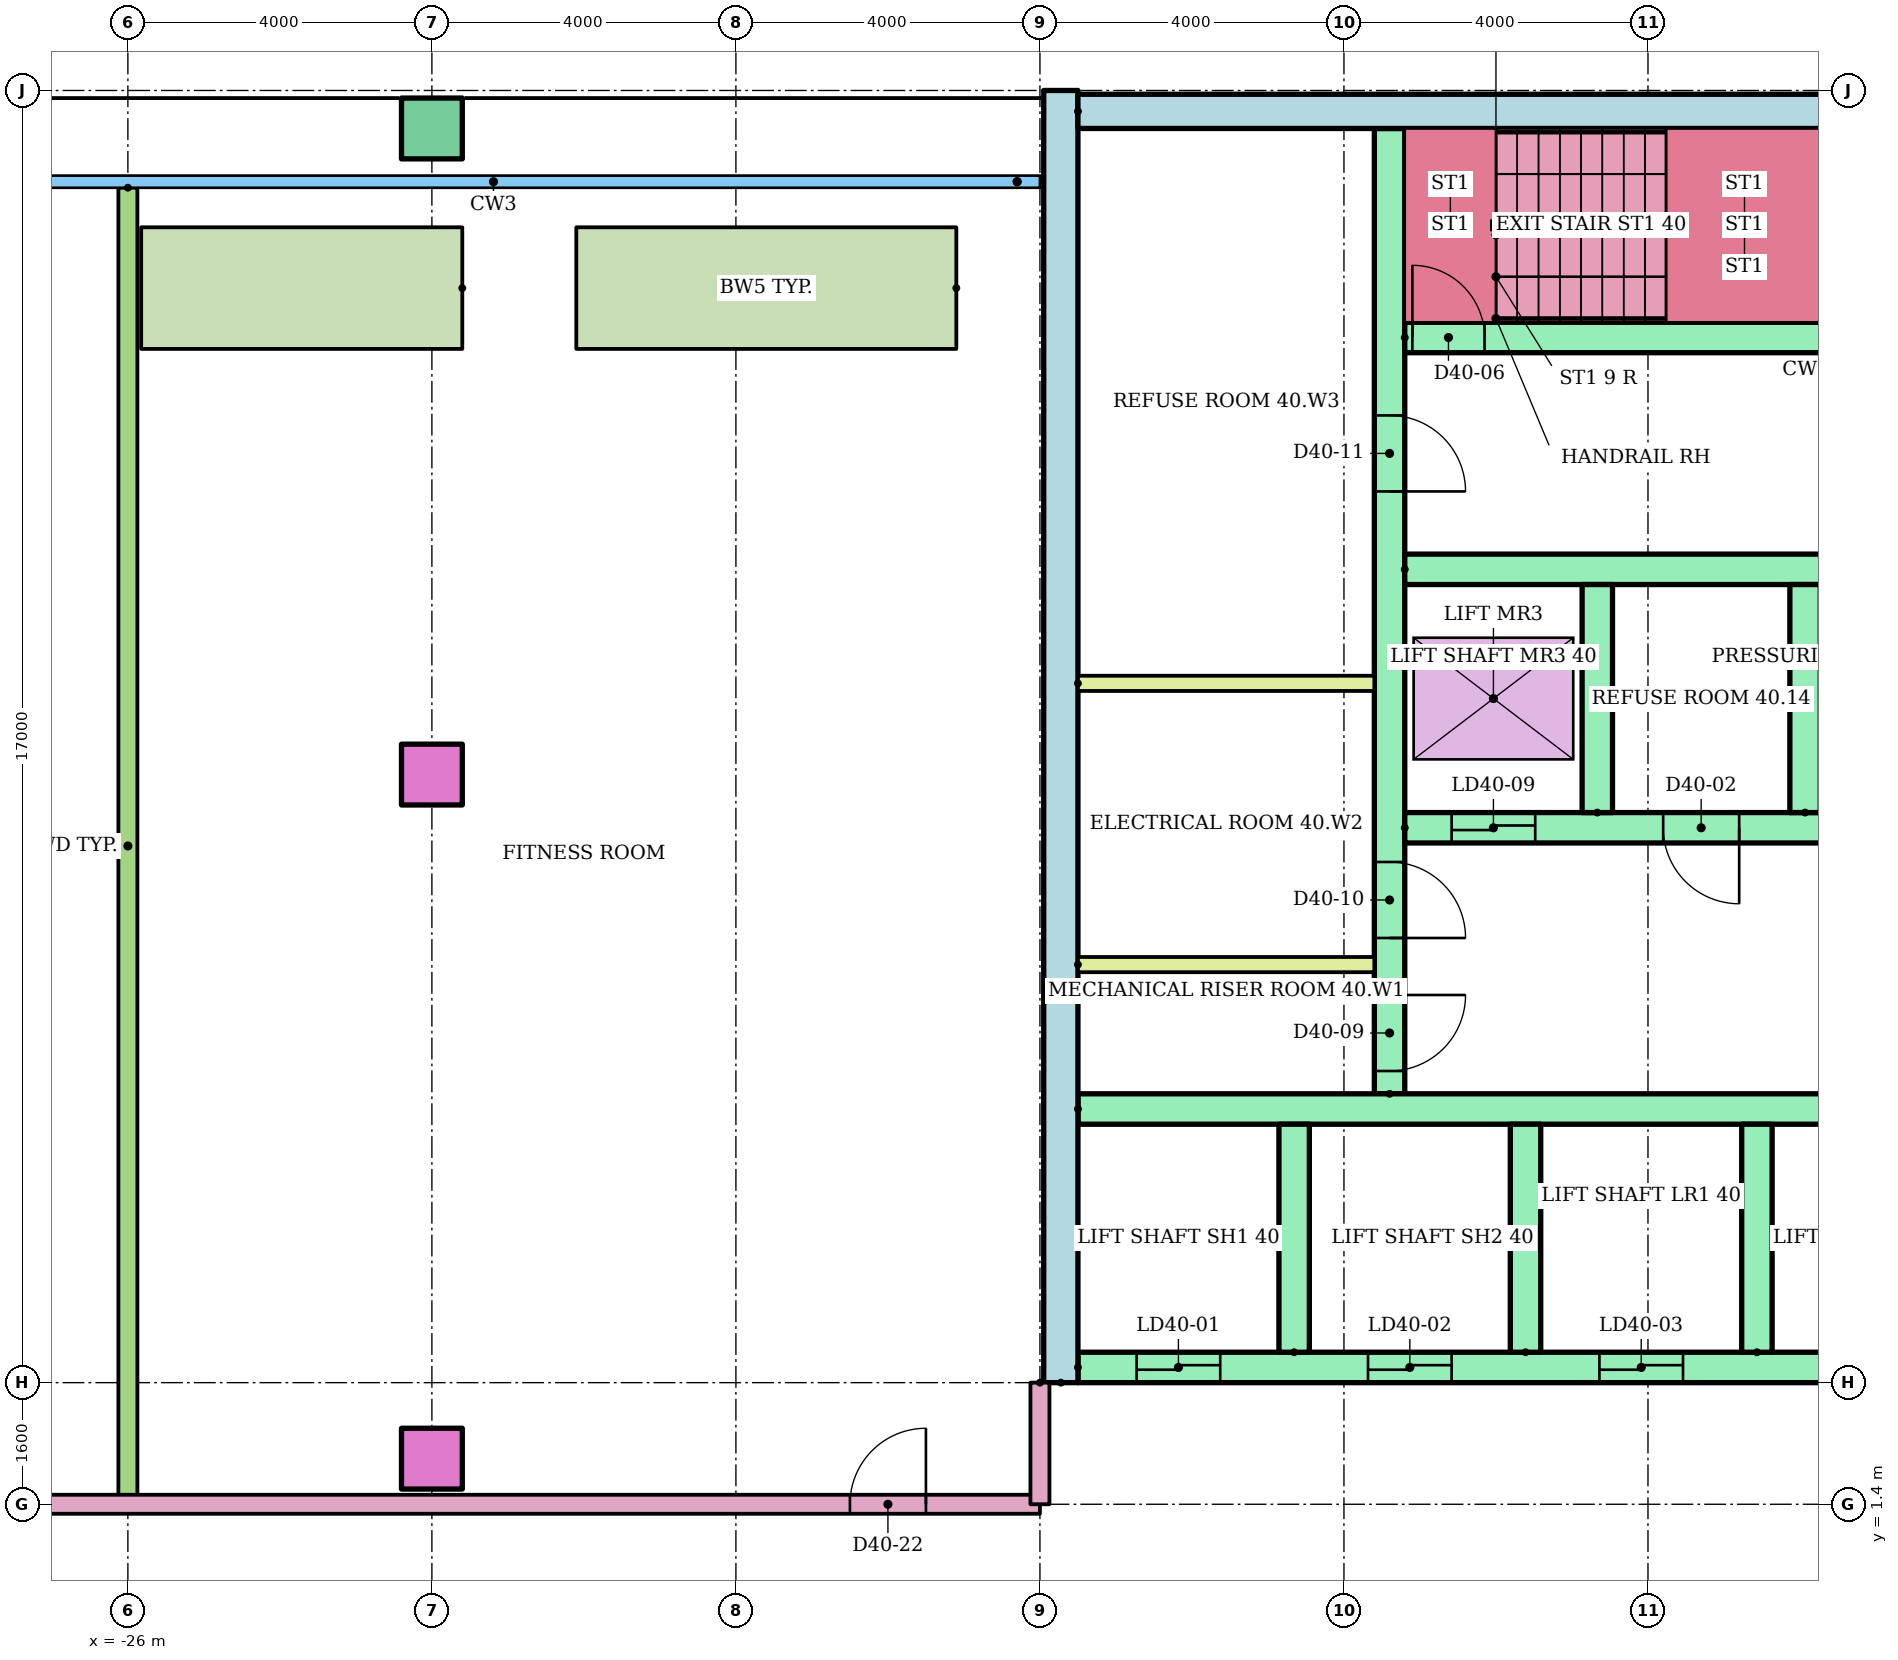
"""IFC4 building model, lengths in metres.
Left out: names, types, materials, properties, quantities, classifications, styles, units other than length and angle.
Written with IfcOpenShell. Run it as: python <this file> out.ifc"""

import sys

from ifc_helpers import new_model, si_unit, direction, frame, frame_2d, origin, origin_2d, place, context, subcontext, project, spatial, rectangle, hollow_rectangle, extrude, element, fill, save


model = new_model("IFC4")
c1 = context("Model", 3, precision=1e-05, world=origin(), true_north=direction((0.0, 1.0)))
c2 = subcontext(c1, "Body", "Model", "MODEL_VIEW")
j1 = project(units=[si_unit("LENGTHUNIT", "METRE"), si_unit("PLANEANGLEUNIT", "RADIAN")], contexts=[c1])
p1 = place(None, origin())
s1 = spatial("IfcSite", under=j1, at=p1, CompositionType="ELEMENT")
p2 = place(p1, origin())
s2 = spatial("IfcBuilding", under=s1, at=p2, CompositionType="ELEMENT")
p3 = place(p2, frame((0.0, 0.0, 151.8)))
s3 = spatial("IfcBuildingStorey", under=s2, at=p3, CompositionType="ELEMENT", Elevation=151.8)
for number, where in (
    (1, (-22.0, 2.0, 0.0)),
    (2, (-22.0, 11.0, 0.0)),
):
    element("IfcColumn", number, at=place(p3, frame(where)), inside=s3, PredefinedType="COLUMN", context=c2, shape_type="SweptSolid", body=[
        extrude(rectangle(XDim=0.8, YDim=0.8, at=origin_2d()), origin(), (0.0, 0.0, 1.0), 9.6),
    ])
p4 = place(p3, frame((-22.0, 19.5, 0.0)))
e3 = element("IfcColumn", 3, at=p4, inside=s3, PredefinedType="COLUMN", context=c2, shape_type="SweptSolid", body=[
    extrude(hollow_rectangle(XDim=0.8, YDim=0.8, WallThickness=0.04, at=origin_2d()), origin(), (0.0, 0.0, 1.0), 8.8),
])
p5 = place(p3, frame((-15.1, 17.4, 0.0), z_axis=(0.0, 0.0, 1.0), x_axis=(-1.0, 0.0, 0.0)))
e4 = element("IfcWall", 4, at=p5, inside=s3, PredefinedType="STANDARD", context=c2, shape_type="SweptSolid", body=[
    extrude(rectangle(XDim=5.0, YDim=1.6, at=frame_2d((2.5, 0.0))), origin(), (0.0, 0.0, 1.0), 0.8),
])
p6 = place(p3, frame((-13.725, 3.0, 0.0), z_axis=(0.0, 0.0, 1.0), x_axis=(0.0, 1.0, 0.0)))
e5 = element("IfcWall", 5, at=p6, inside=s3, PredefinedType="SHEAR", context=c2, shape_type="SweptSolid", body=[
    extrude(rectangle(XDim=17.0, YDim=0.45, at=frame_2d((8.5, 0.0))), origin(), (0.0, 0.0, 1.0), 8.8),
])
p7 = place(p3, frame((-13.5, 19.725, 0.0)))
e6 = element("IfcWall", 6, at=p7, inside=s3, PredefinedType="SHEAR", context=c2, shape_type="SweptSolid", body=[
    extrude(rectangle(XDim=27.0, YDim=0.45, at=frame_2d((13.5, 0.0))), origin(), (0.0, 0.0, 1.0), 8.8),
])
p8 = place(p3, frame((-9.4, 6.8, 0.0), z_axis=(0.0, 0.0, 1.0), x_axis=(0.0, 1.0, 0.0)))
e7 = element("IfcWall", 7, at=p8, inside=s3, PredefinedType="SHEAR", context=c2, shape_type="SweptSolid", body=[
    extrude(rectangle(XDim=12.7, YDim=0.4, at=frame_2d((6.35, 0.0))), origin(), (0.0, 0.0, 1.0), 8.8),
])
p9 = place(p8, frame((0.3, 0.0, 0.0)))
e8 = element("IfcOpeningElement", 8, at=p9, cuts=e7, PredefinedType="OPENING", context=c2, shape_type="SweptSolid", body=[
    extrude(rectangle(XDim=1.0, YDim=2.1, at=frame_2d((0.5, 1.05))), frame((0.0, 0.21, 0.0), z_axis=(0.0, -1.0, 0.0), x_axis=(1.0, 0.0, 0.0)), (0.0, 0.0, 1.0), 0.42),
])
p10 = place(p8, frame((2.05, 0.0, 0.0)))
e9 = element("IfcOpeningElement", 9, at=p10, cuts=e7, PredefinedType="OPENING", context=c2, shape_type="SweptSolid", body=[
    extrude(rectangle(XDim=1.0, YDim=2.1, at=frame_2d((0.5, 1.05))), frame((0.0, 0.21, 0.0), z_axis=(0.0, -1.0, 0.0), x_axis=(1.0, 0.0, 0.0)), (0.0, 0.0, 1.0), 0.42),
])
p11 = place(p8, frame((7.925, 0.0, 0.0)))
e10 = element("IfcOpeningElement", 10, at=p11, cuts=e7, PredefinedType="OPENING", context=c2, shape_type="SweptSolid", body=[
    extrude(rectangle(XDim=1.0, YDim=2.1, at=frame_2d((0.5, 1.05))), frame((0.0, 0.21, 0.0), z_axis=(0.0, -1.0, 0.0), x_axis=(1.0, 0.0, 0.0)), (0.0, 0.0, 1.0), 0.42),
])
p12 = place(p3, frame((-13.5, 3.2, 0.0)))
e11 = element("IfcWall", 11, at=p12, inside=s3, PredefinedType="SHEAR", context=c2, shape_type="SweptSolid", body=[
    extrude(rectangle(XDim=27.0, YDim=0.4, at=frame_2d((13.5, 0.0))), origin(), (0.0, 0.0, 1.0), 8.8),
])
p13 = place(p12, frame((0.772, 0.0, 0.0)))
e12 = element("IfcOpeningElement", 12, at=p13, cuts=e11, PredefinedType="OPENING", context=c2, shape_type="SweptSolid", body=[
    extrude(rectangle(XDim=1.1, YDim=2.1, at=frame_2d((0.55, 1.05))), frame((0.0, 0.21, 0.0), z_axis=(0.0, -1.0, 0.0), x_axis=(1.0, 0.0, 0.0)), (0.0, 0.0, 1.0), 0.42),
])
p14 = place(p12, frame((3.817, 0.0, 0.0)))
e13 = element("IfcOpeningElement", 13, at=p14, cuts=e11, PredefinedType="OPENING", context=c2, shape_type="SweptSolid", body=[
    extrude(rectangle(XDim=1.1, YDim=2.1, at=frame_2d((0.55, 1.05))), frame((0.0, 0.21, 0.0), z_axis=(0.0, -1.0, 0.0), x_axis=(1.0, 0.0, 0.0)), (0.0, 0.0, 1.0), 0.42),
])
p15 = place(p12, frame((6.861, 0.0, 0.0)))
e14 = element("IfcOpeningElement", 14, at=p15, cuts=e11, PredefinedType="OPENING", context=c2, shape_type="SweptSolid", body=[
    extrude(rectangle(XDim=1.1, YDim=2.1, at=frame_2d((0.55, 1.05))), frame((0.0, 0.21, 0.0), z_axis=(0.0, -1.0, 0.0), x_axis=(1.0, 0.0, 0.0)), (0.0, 0.0, 1.0), 0.42),
])
p16 = place(p12, frame((9.906, 0.0, 0.0)))
e15 = element("IfcOpeningElement", 15, at=p16, cuts=e11, PredefinedType="OPENING", context=c2, shape_type="SweptSolid", body=[
    extrude(rectangle(XDim=1.1, YDim=2.1, at=frame_2d((0.55, 1.05))), frame((0.0, 0.21, 0.0), z_axis=(0.0, -1.0, 0.0), x_axis=(1.0, 0.0, 0.0)), (0.0, 0.0, 1.0), 0.42),
])
p17 = place(p12, frame((15.994, 0.0, 0.0)))
e16 = element("IfcOpeningElement", 16, at=p17, cuts=e11, PredefinedType="OPENING", context=c2, shape_type="SweptSolid", body=[
    extrude(rectangle(XDim=1.1, YDim=2.1, at=frame_2d((0.55, 1.05))), frame((0.0, 0.21, 0.0), z_axis=(0.0, -1.0, 0.0), x_axis=(1.0, 0.0, 0.0)), (0.0, 0.0, 1.0), 0.42),
])
p18 = place(p12, frame((19.039, 0.0, 0.0)))
e17 = element("IfcOpeningElement", 17, at=p18, cuts=e11, PredefinedType="OPENING", context=c2, shape_type="SweptSolid", body=[
    extrude(rectangle(XDim=1.1, YDim=2.1, at=frame_2d((0.55, 1.05))), frame((0.0, 0.21, 0.0), z_axis=(0.0, -1.0, 0.0), x_axis=(1.0, 0.0, 0.0)), (0.0, 0.0, 1.0), 0.42),
])
p19 = place(p12, frame((22.083, 0.0, 0.0)))
e18 = element("IfcOpeningElement", 18, at=p19, cuts=e11, PredefinedType="OPENING", context=c2, shape_type="SweptSolid", body=[
    extrude(rectangle(XDim=1.1, YDim=2.1, at=frame_2d((0.55, 1.05))), frame((0.0, 0.21, 0.0), z_axis=(0.0, -1.0, 0.0), x_axis=(1.0, 0.0, 0.0)), (0.0, 0.0, 1.0), 0.42),
])
p20 = place(p12, frame((25.128, 0.0, 0.0)))
e19 = element("IfcOpeningElement", 19, at=p20, cuts=e11, PredefinedType="OPENING", context=c2, shape_type="SweptSolid", body=[
    extrude(rectangle(XDim=1.1, YDim=2.1, at=frame_2d((0.55, 1.05))), frame((0.0, 0.21, 0.0), z_axis=(0.0, -1.0, 0.0), x_axis=(1.0, 0.0, 0.0)), (0.0, 0.0, 1.0), 0.42),
])
p21 = place(p12, frame((12.6, 0.0, 0.0)))
e20 = element("IfcOpeningElement", 20, at=p21, cuts=e11, PredefinedType="OPENING", context=c2, shape_type="SweptSolid", body=[
    extrude(rectangle(XDim=1.8, YDim=2.1, at=frame_2d((0.9, 1.05))), frame((0.0, 0.21, 0.0), z_axis=(0.0, -1.0, 0.0), x_axis=(1.0, 0.0, 0.0)), (0.0, 0.0, 1.0), 0.42),
])
p22 = place(p3, frame((-13.5, 6.6, 0.0)))
e21 = element("IfcWall", 21, at=p22, inside=s3, PredefinedType="SHEAR", context=c2, shape_type="SweptSolid", body=[
    extrude(rectangle(XDim=11.978, YDim=0.4, at=frame_2d((5.989, 0.0))), origin(), (0.0, 0.0, 1.0), 8.8),
])
for number, where, z_axis, x_axis in (
    (22, (-10.656, 3.4, 0.0), (0.0, 0.0, 1.0), (0.0, 1.0, 0.0)),
    (23, (-7.611, 3.4, 0.0), (0.0, 0.0, 1.0), (0.0, 1.0, 0.0)),
    (24, (-4.567, 3.4, 0.0), (0.0, 0.0, 1.0), (0.0, 1.0, 0.0)),
):
    element("IfcWall", number, at=place(p3, frame(where, z_axis=z_axis, x_axis=x_axis)), inside=s3, PredefinedType="SHEAR", context=c2, shape_type="SweptSolid", body=[
        extrude(rectangle(XDim=3.0, YDim=0.4, at=frame_2d((1.5, 0.0))), origin(), (0.0, 0.0, 1.0), 8.8),
    ])
p23 = place(p3, frame((-9.2, 10.3, 0.0)))
e25 = element("IfcWall", 25, at=p23, inside=s3, PredefinedType="SHEAR", context=c2, shape_type="SweptSolid", body=[
    extrude(rectangle(XDim=8.0, YDim=0.4, at=frame_2d((4.0, 0.0))), origin(), (0.0, 0.0, 1.0), 8.8),
])
p24 = place(p23, frame((0.617, 0.0, 0.0)))
e26 = element("IfcOpeningElement", 26, at=p24, cuts=e25, PredefinedType="OPENING", context=c2, shape_type="SweptSolid", body=[
    extrude(rectangle(XDim=1.1, YDim=2.1, at=frame_2d((0.55, 1.05))), frame((0.0, 0.21, 0.0), z_axis=(0.0, -1.0, 0.0), x_axis=(1.0, 0.0, 0.0)), (0.0, 0.0, 1.0), 0.42),
])
p25 = place(p23, frame((3.4, 0.0, 0.0)))
e27 = element("IfcOpeningElement", 27, at=p25, cuts=e25, PredefinedType="OPENING", context=c2, shape_type="SweptSolid", body=[
    extrude(rectangle(XDim=1.0, YDim=2.1, at=frame_2d((0.5, 1.05))), frame((0.0, 0.21, 0.0), z_axis=(0.0, -1.0, 0.0), x_axis=(1.0, 0.0, 0.0)), (0.0, 0.0, 1.0), 0.42),
])
p26 = place(p23, frame((6.133, 0.0, 0.0)))
e28 = element("IfcOpeningElement", 28, at=p26, cuts=e25, PredefinedType="OPENING", context=c2, shape_type="SweptSolid", body=[
    extrude(rectangle(XDim=1.0, YDim=2.1, at=frame_2d((0.5, 1.05))), frame((0.0, 0.21, 0.0), z_axis=(0.0, -1.0, 0.0), x_axis=(1.0, 0.0, 0.0)), (0.0, 0.0, 1.0), 0.42),
])
p27 = place(p3, frame((-9.2, 13.7, 0.0)))
e29 = element("IfcWall", 29, at=p27, inside=s3, PredefinedType="SHEAR", context=c2, shape_type="SweptSolid", body=[
    extrude(rectangle(XDim=8.0, YDim=0.4, at=frame_2d((4.0, 0.0))), origin(), (0.0, 0.0, 1.0), 8.8),
])
for number, where, z_axis, x_axis in (
    (30, (-6.667, 10.5, 0.0), (0.0, 0.0, 1.0), (0.0, 1.0, 0.0)),
    (31, (-3.933, 10.5, 0.0), (0.0, 0.0, 1.0), (0.0, 1.0, 0.0)),
):
    element("IfcWall", number, at=place(p3, frame(where, z_axis=z_axis, x_axis=x_axis)), inside=s3, PredefinedType="SHEAR", context=c2, shape_type="SweptSolid", body=[
        extrude(rectangle(XDim=3.0, YDim=0.4, at=frame_2d((1.5, 0.0))), origin(), (0.0, 0.0, 1.0), 8.8),
    ])
p28 = place(p3, frame((-9.2, 16.75, 0.0)))
e32 = element("IfcWall", 32, at=p28, inside=s3, PredefinedType="SHEAR", context=c2, shape_type="SweptSolid", body=[
    extrude(rectangle(XDim=18.4, YDim=0.4, at=frame_2d((9.2, 0.0))), origin(), (0.0, 0.0, 1.0), 8.8),
])
p29 = place(p28, frame((0.1, 0.0, 0.0)))
e33 = element("IfcOpeningElement", 33, at=p29, cuts=e32, PredefinedType="OPENING", context=c2, shape_type="SweptSolid", body=[
    extrude(rectangle(XDim=0.95, YDim=2.1, at=frame_2d((0.475, 1.05))), frame((0.0, 0.21, 0.0), z_axis=(0.0, -1.0, 0.0), x_axis=(1.0, 0.0, 0.0)), (0.0, 0.0, 1.0), 0.42),
])
p30 = place(p28, frame((6.1, 0.0, 0.0)))
e34 = element("IfcOpeningElement", 34, at=p30, cuts=e32, PredefinedType="OPENING", context=c2, shape_type="SweptSolid", body=[
    extrude(rectangle(XDim=0.95, YDim=2.1, at=frame_2d((0.475, 1.05))), frame((0.0, 0.21, 0.0), z_axis=(0.0, -1.0, 0.0), x_axis=(1.0, 0.0, 0.0)), (0.0, 0.0, 1.0), 0.42),
])
p31 = place(p28, frame((12.1, 0.0, 0.0)))
e35 = element("IfcOpeningElement", 35, at=p31, cuts=e32, PredefinedType="OPENING", context=c2, shape_type="SweptSolid", body=[
    extrude(rectangle(XDim=0.95, YDim=2.1, at=frame_2d((0.475, 1.05))), frame((0.0, 0.21, 0.0), z_axis=(0.0, -1.0, 0.0), x_axis=(1.0, 0.0, 0.0)), (0.0, 0.0, 1.0), 0.42),
])
for number, where in (
    (36, (-13.5, 8.5, 0.0)),
    (37, (-13.5, 12.2, 0.0)),
):
    element("IfcWall", number, at=place(p3, frame(where)), inside=s3, PredefinedType="PARTITIONING", context=c2, shape_type="SweptSolid", body=[
        extrude(rectangle(XDim=3.9, YDim=0.2, at=frame_2d((1.95, 0.0))), origin(), (0.0, 0.0, 1.0), 8.8),
    ])
p32 = place(p3, frame((-29.0, 1.4, 0.0)))
e38 = element("IfcWall", 38, at=p32, inside=s3, PredefinedType="PARTITIONING", context=c2, shape_type="SweptSolid", body=[
    extrude(rectangle(XDim=15.0, YDim=0.25, at=frame_2d((7.5, 0.0))), origin(), (0.0, 0.0, 1.0), 8.8),
])
p33 = place(p32, frame((12.5, 0.0, 0.0)))
e39 = element("IfcOpeningElement", 39, at=p33, cuts=e38, PredefinedType="OPENING", context=c2, shape_type="SweptSolid", body=[
    extrude(rectangle(XDim=1.0, YDim=2.1, at=frame_2d((0.5, 1.05))), frame((0.0, 0.135, 0.0), z_axis=(0.0, -1.0, 0.0), x_axis=(1.0, 0.0, 0.0)), (0.0, 0.0, 1.0), 0.27),
])
p34 = place(p32, frame((0.5, 0.0, 0.0)))
e40 = element("IfcOpeningElement", 40, at=p34, cuts=e38, PredefinedType="OPENING", context=c2, shape_type="SweptSolid", body=[
    extrude(rectangle(XDim=1.0, YDim=2.1, at=frame_2d((0.5, 1.05))), frame((0.0, 0.135, 0.0), z_axis=(0.0, -1.0, 0.0), x_axis=(1.0, 0.0, 0.0)), (0.0, 0.0, 1.0), 0.27),
])
p35 = place(p3, frame((-26.0, 18.721, 0.0), z_axis=(0.0, 0.0, 1.0), x_axis=(0.0, -1.0, 0.0)))
e41 = element("IfcWall", 41, at=p35, inside=s3, PredefinedType="PARTITIONING", context=c2, shape_type="SweptSolid", body=[
    extrude(rectangle(XDim=17.321, YDim=0.25, at=frame_2d((8.661, 0.0))), origin(), (0.0, 0.0, 1.0), 8.8),
])
p36 = place(p3, frame((-14.0, 3.0, 0.0), z_axis=(0.0, 0.0, 1.0), x_axis=(0.0, -1.0, 0.0)))
e42 = element("IfcWall", 42, at=p36, inside=s3, PredefinedType="PARTITIONING", context=c2, shape_type="SweptSolid", body=[
    extrude(rectangle(XDim=1.6, YDim=0.25, at=frame_2d((0.8, 0.0))), origin(), (0.0, 0.0, 1.0), 8.8),
])
p37 = place(p3, frame((-21.6, 17.4, 0.0), z_axis=(0.0, 0.0, 1.0), x_axis=(-1.0, 0.0, 0.0)))
e43 = element("IfcWall", 43, at=p37, inside=s3, PredefinedType="STANDARD", context=c2, shape_type="SweptSolid", body=[
    extrude(rectangle(XDim=4.225, YDim=1.6, at=frame_2d((2.112, 0.0))), origin(), (0.0, 0.0, 1.0), 0.8),
])
p38 = place(p13, origin())
e44 = element("IfcDoor", 44, at=p38, inside=s3, OperationType="SLIDING_TO_LEFT", PredefinedType="DOOR", context=c2, shape_type="SweptSolid", body=[
    extrude(rectangle(XDim=1.1, YDim=2.1, at=frame_2d((0.55, 1.05))), frame((0.0, 0.025, 0.0), z_axis=(0.0, -1.0, 0.0), x_axis=(1.0, 0.0, 0.0)), (0.0, 0.0, 1.0), 0.05),
])
fill(e12, e44)
p39 = place(p14, origin())
e45 = element("IfcDoor", 45, at=p39, inside=s3, OperationType="SLIDING_TO_LEFT", PredefinedType="DOOR", context=c2, shape_type="SweptSolid", body=[
    extrude(rectangle(XDim=1.1, YDim=2.1, at=frame_2d((0.55, 1.05))), frame((0.0, 0.025, 0.0), z_axis=(0.0, -1.0, 0.0), x_axis=(1.0, 0.0, 0.0)), (0.0, 0.0, 1.0), 0.05),
])
fill(e13, e45)
p40 = place(p15, origin())
e46 = element("IfcDoor", 46, at=p40, inside=s3, OperationType="SLIDING_TO_LEFT", PredefinedType="DOOR", context=c2, shape_type="SweptSolid", body=[
    extrude(rectangle(XDim=1.1, YDim=2.1, at=frame_2d((0.55, 1.05))), frame((0.0, 0.025, 0.0), z_axis=(0.0, -1.0, 0.0), x_axis=(1.0, 0.0, 0.0)), (0.0, 0.0, 1.0), 0.05),
])
fill(e14, e46)
p41 = place(p24, origin())
e47 = element("IfcDoor", 47, at=p41, inside=s3, OperationType="SLIDING_TO_LEFT", PredefinedType="DOOR", context=c2, shape_type="SweptSolid", body=[
    extrude(rectangle(XDim=1.1, YDim=2.1, at=frame_2d((0.55, 1.05))), frame((0.0, 0.025, 0.0), z_axis=(0.0, -1.0, 0.0), x_axis=(1.0, 0.0, 0.0)), (0.0, 0.0, 1.0), 0.05),
])
fill(e26, e47)
p42 = place(p25, frame((1.0, 0.0, 0.0), z_axis=(0.0, 0.0, 1.0), x_axis=(-1.0, 0.0, 0.0)))
e48 = element("IfcDoor", 48, at=p42, inside=s3, OperationType="SINGLE_SWING_RIGHT", PredefinedType="DOOR", context=c2, shape_type="SweptSolid", body=[
    extrude(rectangle(XDim=1.0, YDim=2.1, at=frame_2d((0.5, 1.05))), frame((0.0, 0.025, 0.0), z_axis=(0.0, -1.0, 0.0), x_axis=(1.0, 0.0, 0.0)), (0.0, 0.0, 1.0), 0.05),
])
fill(e27, e48)
p43 = place(p29, origin())
e49 = element("IfcDoor", 49, at=p43, inside=s3, OperationType="SINGLE_SWING_LEFT", PredefinedType="DOOR", context=c2, shape_type="SweptSolid", body=[
    extrude(rectangle(XDim=0.95, YDim=2.1, at=frame_2d((0.475, 1.05))), frame((0.0, 0.025, 0.0), z_axis=(0.0, -1.0, 0.0), x_axis=(1.0, 0.0, 0.0)), (0.0, 0.0, 1.0), 0.05),
])
fill(e33, e49)
p44 = place(p9, frame((1.0, 0.0, 0.0), z_axis=(0.0, 0.0, 1.0), x_axis=(-1.0, 0.0, 0.0)))
e50 = element("IfcDoor", 50, at=p44, inside=s3, OperationType="SINGLE_SWING_RIGHT", PredefinedType="DOOR", context=c2, shape_type="SweptSolid", body=[
    extrude(rectangle(XDim=1.0, YDim=2.1, at=frame_2d((0.5, 1.05))), frame((0.0, 0.025, 0.0), z_axis=(0.0, -1.0, 0.0), x_axis=(1.0, 0.0, 0.0)), (0.0, 0.0, 1.0), 0.05),
])
fill(e8, e50)
p45 = place(p10, frame((1.0, 0.0, 0.0), z_axis=(0.0, 0.0, 1.0), x_axis=(-1.0, 0.0, 0.0)))
e51 = element("IfcDoor", 51, at=p45, inside=s3, OperationType="SINGLE_SWING_LEFT", PredefinedType="DOOR", context=c2, shape_type="SweptSolid", body=[
    extrude(rectangle(XDim=1.0, YDim=2.1, at=frame_2d((0.5, 1.05))), frame((0.0, 0.025, 0.0), z_axis=(0.0, -1.0, 0.0), x_axis=(1.0, 0.0, 0.0)), (0.0, 0.0, 1.0), 0.05),
])
fill(e9, e51)
p46 = place(p11, frame((1.0, 0.0, 0.0), z_axis=(0.0, 0.0, 1.0), x_axis=(-1.0, 0.0, 0.0)))
e52 = element("IfcDoor", 52, at=p46, inside=s3, OperationType="SINGLE_SWING_LEFT", PredefinedType="DOOR", context=c2, shape_type="SweptSolid", body=[
    extrude(rectangle(XDim=1.0, YDim=2.1, at=frame_2d((0.5, 1.05))), frame((0.0, 0.025, 0.0), z_axis=(0.0, -1.0, 0.0), x_axis=(1.0, 0.0, 0.0)), (0.0, 0.0, 1.0), 0.05),
])
fill(e10, e52)
p47 = place(p33, origin())
e53 = element("IfcDoor", 53, at=p47, inside=s3, OperationType="SINGLE_SWING_RIGHT", PredefinedType="DOOR", context=c2, shape_type="SweptSolid", body=[
    extrude(rectangle(XDim=1.0, YDim=2.1, at=frame_2d((0.5, 1.05))), frame((0.0, 0.025, 0.0), z_axis=(0.0, -1.0, 0.0), x_axis=(1.0, 0.0, 0.0)), (0.0, 0.0, 1.0), 0.05),
])
fill(e39, e53)
save(model, sys.argv[1])
